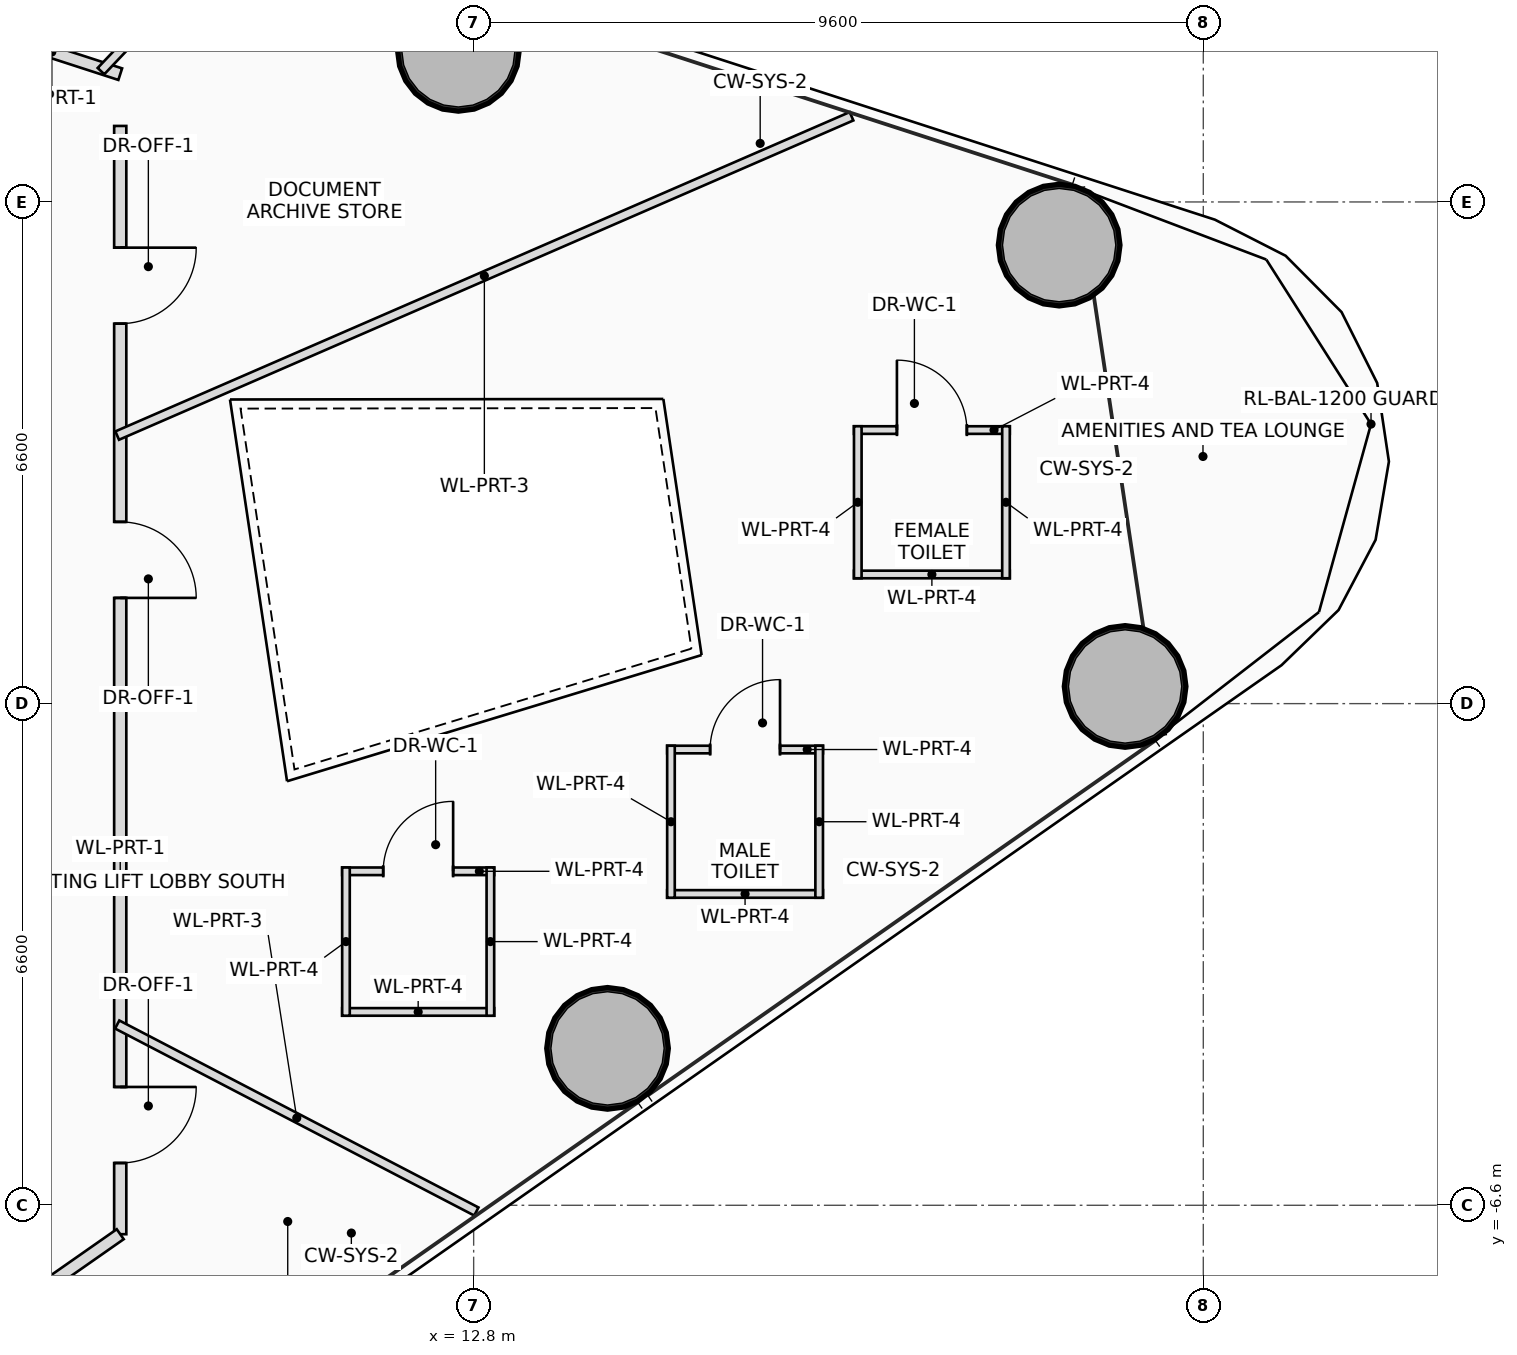
"""IFC4 building model, lengths in metres.
Left out: names, types, materials, properties, quantities, classifications, styles, units other than length and angle.
Written with IfcOpenShell. Run it as: python <this file> out.ifc"""

import sys

from ifc_helpers import new_model, si_unit, direction, frame, frame_2d, origin, origin_2d, place, context, subcontext, project, spatial, rectangle, hollow_circle, extrude, source, transform, mapped, element, fill, save


model = new_model("IFC4")
c1 = context("Model", 3, precision=1e-05, world=origin(), true_north=direction((0.0, 1.0)))
c2 = subcontext(c1, "Body", "Model", "MODEL_VIEW")
j1 = project(units=[si_unit("LENGTHUNIT", "METRE"), si_unit("PLANEANGLEUNIT", "RADIAN")], contexts=[c1])
p1 = place(None, origin())
s1 = spatial("IfcSite", under=j1, at=p1, CompositionType="ELEMENT")
p2 = place(p1, origin())
s2 = spatial("IfcBuilding", under=s1, at=p2, CompositionType="ELEMENT")
p3 = place(p2, frame((0.0, 0.0, 77.3)))
s3 = spatial("IfcBuildingStorey", under=s2, at=p3, CompositionType="ELEMENT", Elevation=77.3)
m1 = source(origin(), c2, "Body", "SweptSolid", [
    extrude(hollow_circle(Radius=0.8, WallThickness=0.055, at=origin_2d()), origin(), (0.0, 0.0, 1.0), 3.75),
])
for number, where, z_axis, x_axis in (
    (1, (14.562, -4.535, 0.0), (0.0, 0.0, 1.0), (1.0, 0.0, 0.0)),
    (2, (21.371, 0.226, 0.0), (0.0, 0.0, 1.0), (1.0, 0.0, 0.0)),
    (3, (20.503, 6.032, 0.0), (0.0, 0.0, 1.0), (1.0, 0.0, 0.0)),
    (4, (12.599, 8.594, 0.0), (0.0, 0.0, 1.0), (1.0, 0.0, 0.0)),
):
    element("IfcColumn", number, at=place(p3, frame(where, z_axis=z_axis, x_axis=x_axis)), inside=s3, PredefinedType="COLUMN", context=c2, shape_type="MappedRepresentation", body=[
        mapped(m1, transform((0.0, 0.0, 0.0), scale=1.0)),
    ])
p4 = place(p3, frame((15.346, -0.604, 0.0), z_axis=(0.0, 0.0, 1.0), x_axis=(1.0, 0.0, 0.0)))
e5 = element("IfcWall", 5, at=p4, inside=s3, PredefinedType="PARTITIONING", context=c2, shape_type="SweptSolid", body=[
    extrude(rectangle(XDim=2.05, YDim=0.1, at=frame_2d((1.025, 0.0))), origin(), (0.0, 0.0, 1.0), 3.2),
])
p5 = place(p4, frame((0.565, 0.0, 0.0)))
e6 = element("IfcOpeningElement", 6, at=p5, cuts=e5, PredefinedType="OPENING", context=c2, shape_type="SweptSolid", body=[
    extrude(rectangle(XDim=0.92, YDim=2.1, at=frame_2d((0.46, 1.05))), frame((0.0, 0.06, 0.0), z_axis=(0.0, -1.0, 0.0), x_axis=(1.0, 0.0, 0.0)), (0.0, 0.0, 1.0), 0.12),
])
p6 = place(p3, frame((17.396, -2.504, 0.0), z_axis=(0.0, 0.0, 1.0), x_axis=(-1.0, 0.0, 0.0)))
e7 = element("IfcWall", 7, at=p6, inside=s3, PredefinedType="PARTITIONING", context=c2, shape_type="SweptSolid", body=[
    extrude(rectangle(XDim=2.05, YDim=0.1, at=frame_2d((1.025, 0.0))), origin(), (0.0, 0.0, 1.0), 3.01),
])
for number, where, z_axis, x_axis in (
    (8, (17.346, -0.554, 0.0), (0.0, 0.0, 1.0), (0.0, -1.0, 0.0)),
    (9, (15.396, -2.554, 0.0), (0.0, 0.0, 1.0), (0.0, 1.0, 0.0)),
):
    element("IfcWall", number, at=place(p3, frame(where, z_axis=z_axis, x_axis=x_axis)), inside=s3, PredefinedType="PARTITIONING", context=c2, shape_type="SweptSolid", body=[
        extrude(rectangle(XDim=2.0, YDim=0.1, at=frame_2d((1.0, 0.0))), origin(), (0.0, 0.0, 1.0), 2.85),
    ])
p7 = place(p3, frame((17.804, 3.599, 0.0), z_axis=(0.0, 0.0, 1.0), x_axis=(1.0, 0.0, 0.0)))
e10 = element("IfcWall", 10, at=p7, inside=s3, PredefinedType="PARTITIONING", context=c2, shape_type="SweptSolid", body=[
    extrude(rectangle(XDim=2.05, YDim=0.1, at=frame_2d((1.025, 0.0))), origin(), (0.0, 0.0, 1.0), 3.545),
])
p8 = place(p7, frame((0.565, 0.0, 0.0)))
e11 = element("IfcOpeningElement", 11, at=p8, cuts=e10, PredefinedType="OPENING", context=c2, shape_type="SweptSolid", body=[
    extrude(rectangle(XDim=0.92, YDim=2.1, at=frame_2d((0.46, 1.05))), frame((0.0, 0.06, 0.0), z_axis=(0.0, -1.0, 0.0), x_axis=(1.0, 0.0, 0.0)), (0.0, 0.0, 1.0), 0.12),
])
p9 = place(p3, frame((19.854, 1.699, 0.0), z_axis=(0.0, 0.0, 1.0), x_axis=(-1.0, 0.0, 0.0)))
e12 = element("IfcWall", 12, at=p9, inside=s3, PredefinedType="PARTITIONING", context=c2, shape_type="SweptSolid", body=[
    extrude(rectangle(XDim=2.05, YDim=0.1, at=frame_2d((1.025, 0.0))), origin(), (0.0, 0.0, 1.0), 3.545),
])
for number, where, z_axis, x_axis in (
    (13, (19.804, 3.649, 0.0), (0.0, 0.0, 1.0), (0.0, -1.0, 0.0)),
    (14, (17.854, 1.649, 0.0), (0.0, 0.0, 1.0), (0.0, 1.0, 0.0)),
):
    element("IfcWall", number, at=place(p3, frame(where, z_axis=z_axis, x_axis=x_axis)), inside=s3, PredefinedType="PARTITIONING", context=c2, shape_type="SweptSolid", body=[
        extrude(rectangle(XDim=2.0, YDim=0.1, at=frame_2d((1.0, 0.0))), origin(), (0.0, 0.0, 1.0), 3.545),
    ])
p10 = place(p3, frame((11.07, -2.206, 0.0), z_axis=(0.0, 0.0, 1.0), x_axis=(1.0, 0.0, 0.0)))
e15 = element("IfcWall", 15, at=p10, inside=s3, PredefinedType="PARTITIONING", context=c2, shape_type="SweptSolid", body=[
    extrude(rectangle(XDim=2.0, YDim=0.1, at=frame_2d((1.0, 0.0))), origin(), (0.0, 0.0, 1.0), 3.545),
])
p11 = place(p10, frame((0.54, 0.0, 0.0)))
e16 = element("IfcOpeningElement", 16, at=p11, cuts=e15, PredefinedType="OPENING", context=c2, shape_type="SweptSolid", body=[
    extrude(rectangle(XDim=0.92, YDim=2.1, at=frame_2d((0.46, 1.05))), frame((0.0, 0.06, 0.0), z_axis=(0.0, -1.0, 0.0), x_axis=(1.0, 0.0, 0.0)), (0.0, 0.0, 1.0), 0.12),
])
p12 = place(p3, frame((13.07, -4.056, 0.0), z_axis=(0.0, 0.0, 1.0), x_axis=(-1.0, 0.0, 0.0)))
e17 = element("IfcWall", 17, at=p12, inside=s3, PredefinedType="PARTITIONING", context=c2, shape_type="SweptSolid", body=[
    extrude(rectangle(XDim=2.0, YDim=0.1, at=frame_2d((1.0, 0.0))), origin(), (0.0, 0.0, 1.0), 3.545),
])
for number, where, z_axis, x_axis in (
    (18, (13.02, -2.156, 0.0), (0.0, 0.0, 1.0), (0.0, -1.0, 0.0)),
    (19, (11.12, -4.106, 0.0), (0.0, 0.0, 1.0), (0.0, 1.0, 0.0)),
):
    element("IfcWall", number, at=place(p3, frame(where, z_axis=z_axis, x_axis=x_axis)), inside=s3, PredefinedType="PARTITIONING", context=c2, shape_type="SweptSolid", body=[
        extrude(rectangle(XDim=1.95, YDim=0.1, at=frame_2d((0.975, 0.0))), origin(), (0.0, 0.0, 1.0), 2.85),
    ])
p13 = place(p3, frame((6.35, 8.865, 0.0), z_axis=(0.0, 0.0, 1.0), x_axis=(0.951257609277, -0.30839740724, 0.0)))
e20 = element("IfcWall", 20, at=p13, inside=s3, PredefinedType="PARTITIONING", context=c2, shape_type="SweptSolid", body=[
    extrude(rectangle(XDim=1.892, YDim=0.16, at=frame_2d((0.946, 0.0))), origin(), (0.0, 0.0, 1.0), 3.2),
])
p14 = place(p3, frame((8.15, 7.6, 0.0), z_axis=(0.0, 0.0, 1.0), x_axis=(0.0, -1.0, 0.0)))
e21 = element("IfcWall", 21, at=p14, inside=s3, PredefinedType="PARTITIONING", context=c2, shape_type="SweptSolid", body=[
    extrude(rectangle(XDim=7.58, YDim=0.16, at=frame_2d((3.79, 0.0))), origin(), (0.0, 0.0, 1.0), 2.85),
])
p15 = place(p14, frame((1.601, 0.0, 0.0)))
e22 = element("IfcOpeningElement", 22, at=p15, cuts=e21, PredefinedType="OPENING", context=c2, shape_type="SweptSolid", body=[
    extrude(rectangle(XDim=1.0, YDim=2.25, at=frame_2d((0.5, 1.125))), frame((0.0, 0.09, 0.0), z_axis=(0.0, -1.0, 0.0), x_axis=(1.0, 0.0, 0.0)), (0.0, 0.0, 1.0), 0.18),
])
p16 = place(p14, frame((5.209, 0.0, 0.0)))
e23 = element("IfcOpeningElement", 23, at=p16, cuts=e21, PredefinedType="OPENING", context=c2, shape_type="SweptSolid", body=[
    extrude(rectangle(XDim=1.0, YDim=2.25, at=frame_2d((0.5, 1.125))), frame((0.0, 0.09, 0.0), z_axis=(0.0, -1.0, 0.0), x_axis=(1.0, 0.0, 0.0)), (0.0, 0.0, 1.0), 0.18),
])
p17 = place(p3, frame((8.15, -0.02, 0.0), z_axis=(0.0, 0.0, 1.0), x_axis=(0.0, -1.0, 0.0)))
e24 = element("IfcWall", 24, at=p17, inside=s3, PredefinedType="PARTITIONING", context=c2, shape_type="SweptSolid", body=[
    extrude(rectangle(XDim=6.96, YDim=0.16, at=frame_2d((3.48, 0.0))), origin(), (0.0, 0.0, 1.0), 2.85),
])
p18 = place(p17, frame((5.023, 0.0, 0.0)))
e25 = element("IfcOpeningElement", 25, at=p18, cuts=e24, PredefinedType="OPENING", context=c2, shape_type="SweptSolid", body=[
    extrude(rectangle(XDim=1.0, YDim=2.25, at=frame_2d((0.5, 1.125))), frame((0.0, 0.09, 0.0), z_axis=(0.0, -1.0, 0.0), x_axis=(1.0, 0.0, 0.0)), (0.0, 0.0, 1.0), 0.18),
])
p19 = place(p3, frame((8.15, -6.98, 0.0), z_axis=(0.0, 0.0, 1.0), x_axis=(-0.819513839239, -0.573059392468, 0.0)))
e26 = element("IfcWall", 26, at=p19, inside=s3, PredefinedType="PARTITIONING", context=c2, shape_type="SweptSolid", body=[
    extrude(rectangle(XDim=2.196, YDim=0.16, at=frame_2d((1.098, 0.0))), origin(), (0.0, 0.0, 1.0), 2.85),
])
p20 = place(p3, frame((8.11, -4.222, 0.0), z_axis=(0.0, 0.0, 1.0), x_axis=(0.886984089822, -0.461799983112, 0.0)))
e27 = element("IfcWall", 27, at=p20, inside=s3, PredefinedType="PARTITIONING", context=c2, shape_type="SweptSolid", body=[
    extrude(rectangle(XDim=5.327, YDim=0.12, at=frame_2d((2.664, 0.0))), origin(), (0.0, 0.0, 1.0), 2.85),
])
p21 = place(p3, frame((8.11, 3.526, 0.0), z_axis=(0.0, 0.0, 1.0), x_axis=(0.917062319349, 0.398743905823, 0.0)))
e28 = element("IfcWall", 28, at=p21, inside=s3, PredefinedType="PARTITIONING", context=c2, shape_type="SweptSolid", body=[
    extrude(rectangle(XDim=10.535, YDim=0.12, at=frame_2d((5.268, 0.0))), origin(), (0.0, 0.0, 1.0), 2.85),
])
p22 = place(p3, frame((7.897, 8.321, 0.0), z_axis=(0.0, 0.0, 1.0), x_axis=(0.688345527251, 0.725382957556, 0.0)))
e29 = element("IfcWall", 29, at=p22, inside=s3, PredefinedType="PARTITIONING", context=c2, shape_type="SweptSolid", body=[
    extrude(rectangle(XDim=2.749, YDim=0.12, at=frame_2d((1.375, 0.0))), origin(), (0.0, 0.0, 1.0), 3.01),
])
p23 = place(p5, origin())
e30 = element("IfcDoor", 30, at=p23, inside=s3, OperationType="SINGLE_SWING_RIGHT", PredefinedType="DOOR", context=c2, shape_type="SweptSolid", body=[
    extrude(rectangle(XDim=0.92, YDim=2.1, at=frame_2d((0.46, 1.05))), frame((0.0, 0.025, 0.0), z_axis=(0.0, -1.0, 0.0), x_axis=(1.0, 0.0, 0.0)), (0.0, 0.0, 1.0), 0.05),
])
fill(e6, e30)
p24 = place(p8, origin())
e31 = element("IfcDoor", 31, at=p24, inside=s3, OperationType="SINGLE_SWING_LEFT", PredefinedType="DOOR", context=c2, shape_type="SweptSolid", body=[
    extrude(rectangle(XDim=0.92, YDim=2.1, at=frame_2d((0.46, 1.05))), frame((0.0, 0.025, 0.0), z_axis=(0.0, -1.0, 0.0), x_axis=(1.0, 0.0, 0.0)), (0.0, 0.0, 1.0), 0.05),
])
fill(e11, e31)
p25 = place(p11, origin())
e32 = element("IfcDoor", 32, at=p25, inside=s3, OperationType="SINGLE_SWING_RIGHT", PredefinedType="DOOR", context=c2, shape_type="SweptSolid", body=[
    extrude(rectangle(XDim=0.92, YDim=2.1, at=frame_2d((0.46, 1.05))), frame((0.0, 0.025, 0.0), z_axis=(0.0, -1.0, 0.0), x_axis=(1.0, 0.0, 0.0)), (0.0, 0.0, 1.0), 0.05),
])
fill(e16, e32)
p26 = place(p15, origin())
e33 = element("IfcDoor", 33, at=p26, inside=s3, OperationType="SINGLE_SWING_LEFT", PredefinedType="DOOR", context=c2, shape_type="SweptSolid", body=[
    extrude(rectangle(XDim=1.0, YDim=2.25, at=frame_2d((0.5, 1.125))), frame((0.0, 0.025, 0.0), z_axis=(0.0, -1.0, 0.0), x_axis=(1.0, 0.0, 0.0)), (0.0, 0.0, 1.0), 0.05),
])
fill(e22, e33)
p27 = place(p16, origin())
e34 = element("IfcDoor", 34, at=p27, inside=s3, OperationType="SINGLE_SWING_RIGHT", PredefinedType="DOOR", context=c2, shape_type="SweptSolid", body=[
    extrude(rectangle(XDim=1.0, YDim=2.25, at=frame_2d((0.5, 1.125))), frame((0.0, 0.025, 0.0), z_axis=(0.0, -1.0, 0.0), x_axis=(1.0, 0.0, 0.0)), (0.0, 0.0, 1.0), 0.05),
])
fill(e23, e34)
p28 = place(p18, origin())
e35 = element("IfcDoor", 35, at=p28, inside=s3, OperationType="SINGLE_SWING_LEFT", PredefinedType="DOOR", context=c2, shape_type="SweptSolid", body=[
    extrude(rectangle(XDim=1.0, YDim=2.25, at=frame_2d((0.5, 1.125))), frame((0.0, 0.025, 0.0), z_axis=(0.0, -1.0, 0.0), x_axis=(1.0, 0.0, 0.0)), (0.0, 0.0, 1.0), 0.05),
])
fill(e25, e35)
save(model, sys.argv[1])
